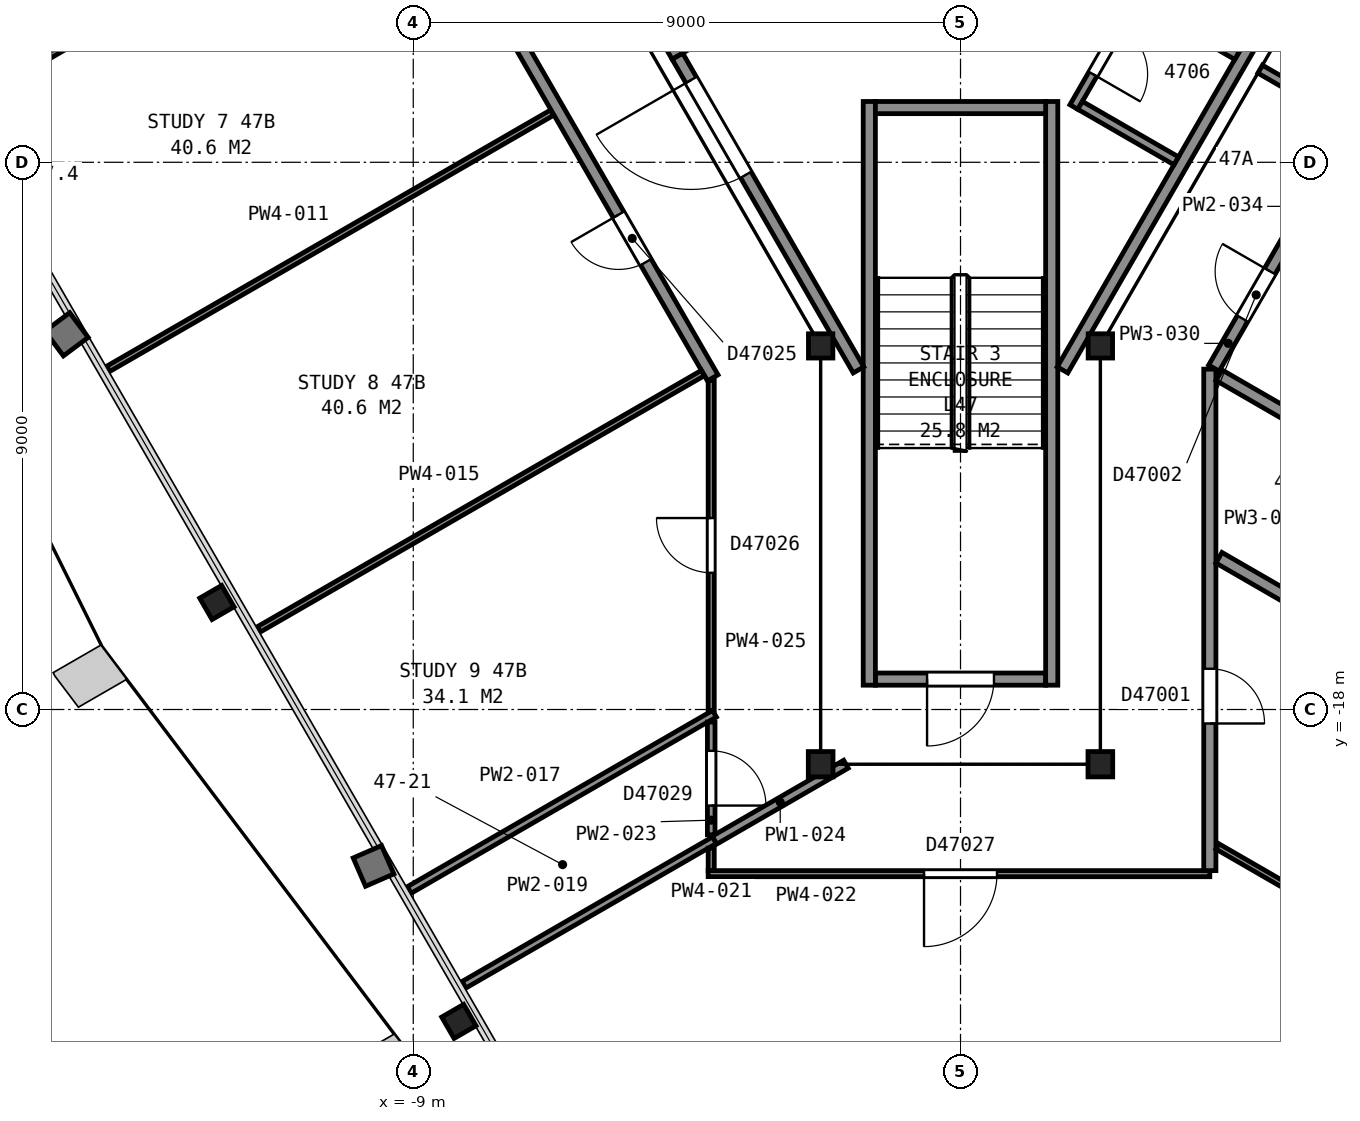
"""IFC4 building model, lengths in metres.
Left out: names, types, materials, properties, quantities, classifications, styles, units other than length and angle.
Written with IfcOpenShell. Run it as: python <this file> out.ifc"""

import sys

from ifc_helpers import new_model, si_unit, direction, frame, frame_2d, origin, origin_2d, place, context, subcontext, project, spatial, rectangle, i_section, extrude, element, fill, save


model = new_model("IFC4")
c1 = context("Model", 3, precision=1e-05, world=origin(), true_north=direction((0.0, 1.0)))
c2 = subcontext(c1, "Body", "Model", "MODEL_VIEW")
j1 = project(units=[si_unit("LENGTHUNIT", "METRE"), si_unit("PLANEANGLEUNIT", "RADIAN")], contexts=[c1])
p1 = place(None, origin())
s1 = spatial("IfcSite", under=j1, at=p1, CompositionType="ELEMENT")
p2 = place(p1, origin())
s2 = spatial("IfcBuilding", under=s1, at=p2, CompositionType="ELEMENT")
p3 = place(p2, frame((0.0, 0.0, 189.5)))
s3 = spatial("IfcBuildingStorey", under=s2, at=p3, CompositionType="ELEMENT", Elevation=189.5)
p4 = place(p3, frame((-12.23, -16.24, 0.035), z_axis=(0.0, 0.0, 1.0), x_axis=(-0.5, 0.866025403784, 0.0)))
e1 = element("IfcColumn", 1, at=p4, inside=s3, PredefinedType="COLUMN", context=c2, shape_type="SweptSolid", body=[
    extrude(i_section(OverallWidth=0.406, OverallDepth=0.417, WebThickness=0.03, FlangeThickness=0.048, FilletRadius=0.015, at=origin_2d()), origin(), (0.0, 0.0, 1.0), 3.665),
])
p5 = place(p3, frame((-8.25, -23.13, 0.04), z_axis=(0.0, 0.0, 1.0), x_axis=(-0.5, 0.866025403784, 0.0)))
e2 = element("IfcColumn", 2, at=p5, inside=s3, PredefinedType="COLUMN", context=c2, shape_type="SweptSolid", body=[
    extrude(i_section(OverallWidth=0.406, OverallDepth=0.417, WebThickness=0.03, FlangeThickness=0.048, FilletRadius=0.015, at=origin_2d()), origin(), (0.0, 0.0, 1.0), 3.66),
])
p6 = place(p3, frame((-2.3, -12.02, 0.0), z_axis=(0.0, 0.0, 1.0), x_axis=(1.0, 0.0, 0.0)))
e3 = element("IfcColumn", 3, at=p6, inside=s3, PredefinedType="COLUMN", context=c2, shape_type="SweptSolid", body=[
    extrude(i_section(OverallWidth=0.401, OverallDepth=0.399, WebThickness=0.025, FlangeThickness=0.04, FilletRadius=0.015, at=origin_2d()), origin(), (0.0, 0.0, 1.0), 3.7),
])
for number, where, z_axis, x_axis in (
    (4, (-2.3, -18.9, 0.0), (0.0, 0.0, 1.0), (-1.0, 0.0, 0.0)),
    (5, (2.3, -18.9, 0.0), (0.0, 0.0, 1.0), (-1.0, 0.0, 0.0)),
):
    element("IfcColumn", number, at=place(p3, frame(where, z_axis=z_axis, x_axis=x_axis)), inside=s3, PredefinedType="COLUMN", context=c2, shape_type="SweptSolid", body=[
        extrude(i_section(OverallWidth=0.406, OverallDepth=0.417, WebThickness=0.03, FlangeThickness=0.048, FilletRadius=0.015, at=origin_2d()), origin(), (0.0, 0.0, 1.0), 3.7),
    ])
p7 = place(p3, frame((2.3, -12.02, 0.0), z_axis=(0.0, 0.0, 1.0), x_axis=(1.0, 0.0, 0.0)))
e6 = element("IfcColumn", 6, at=p7, inside=s3, PredefinedType="COLUMN", context=c2, shape_type="SweptSolid", body=[
    extrude(i_section(OverallWidth=0.401, OverallDepth=0.399, WebThickness=0.025, FlangeThickness=0.04, FilletRadius=0.015, at=origin_2d()), origin(), (0.0, 0.0, 1.0), 3.7),
])
p8 = place(p3, frame((-1.4, -17.5, 0.0), z_axis=(0.0, 0.0, 1.0), x_axis=(1.0, 0.0, 0.0)))
e7 = element("IfcWall", 7, at=p8, inside=s3, PredefinedType="PARTITIONING", context=c2, shape_type="SweptSolid", body=[
    extrude(rectangle(XDim=2.8, YDim=0.2, at=frame_2d((1.4, 0.0))), origin(), (0.0, 0.0, 1.0), 3.45),
])
p9 = place(p8, frame((0.85, 0.0, 0.0)))
e8 = element("IfcOpeningElement", 8, at=p9, cuts=e7, PredefinedType="OPENING", context=c2, shape_type="SweptSolid", body=[
    extrude(rectangle(XDim=1.1, YDim=2.1, at=frame_2d((0.55, 1.05))), frame((0.0, 0.11, 0.0), z_axis=(0.0, -1.0, 0.0), x_axis=(1.0, 0.0, 0.0)), (0.0, 0.0, 1.0), 0.22),
])
for number, where, z_axis, x_axis in (
    (9, (1.5, -8.0, 0.0), (0.0, 0.0, 1.0), (0.0, -1.0, 0.0)),
    (10, (-1.5, -8.0, 0.0), (0.0, 0.0, 1.0), (0.0, -1.0, 0.0)),
):
    element("IfcWall", number, at=place(p3, frame(where, z_axis=z_axis, x_axis=x_axis)), inside=s3, PredefinedType="PARTITIONING", context=c2, shape_type="SweptSolid", body=[
        extrude(rectangle(XDim=9.6, YDim=0.2, at=frame_2d((4.8, 0.0))), origin(), (0.0, 0.0, 1.0), 3.45),
    ])
p10 = place(p3, frame((-1.4, -8.1, 0.0), z_axis=(0.0, 0.0, 1.0), x_axis=(1.0, 0.0, 0.0)))
e11 = element("IfcWall", 11, at=p10, inside=s3, PredefinedType="PARTITIONING", context=c2, shape_type="SweptSolid", body=[
    extrude(rectangle(XDim=2.8, YDim=0.2, at=frame_2d((1.4, 0.0))), origin(), (0.0, 0.0, 1.0), 3.45),
])
p11 = place(p3, frame((-4.62, -7.118, 0.0), z_axis=(0.0, 0.0, 1.0), x_axis=(0.866036909293, 0.499980071345, 0.0)))
e12 = element("IfcWall", 12, at=p11, inside=s3, PredefinedType="PARTITIONING", context=c2, shape_type="SweptSolid", body=[
    extrude(rectangle(XDim=1.75, YDim=0.2, at=frame_2d((0.875, 0.0))), origin(), (0.0, 0.0, 1.0), 3.7),
])
p12 = place(p3, frame((-4.656, -7.255, 0.0), z_axis=(0.0, 0.0, 1.0), x_axis=(-0.499990435942, 0.866030925526, 0.0)))
e13 = element("IfcWall", 13, at=p12, inside=s3, PredefinedType="PARTITIONING", context=c2, shape_type="SweptSolid", body=[
    extrude(rectangle(XDim=2.55, YDim=0.2, at=frame_2d((1.275, 0.0))), origin(), (0.0, 0.0, 1.0), 3.7),
])
p13 = place(p3, frame((-4.655, -7.257, 0.0), z_axis=(0.0, 0.0, 1.0), x_axis=(0.499966124405, -0.866044960985, 0.0)))
e14 = element("IfcWall", 14, at=p13, inside=s3, PredefinedType="PARTITIONING", context=c2, shape_type="SweptSolid", body=[
    extrude(rectangle(XDim=5.956, YDim=0.2, at=frame_2d((2.978, 0.0))), origin(), (0.0, 0.0, 1.0), 3.45),
])
p14 = place(p13, frame((0.45, 0.0, 0.0)))
e15 = element("IfcOpeningElement", 15, at=p14, cuts=e14, PredefinedType="OPENING", context=c2, shape_type="SweptSolid", body=[
    extrude(rectangle(XDim=1.8, YDim=2.1, at=frame_2d((0.9, 1.05))), frame((0.0, 0.11, 0.0), z_axis=(0.0, -1.0, 0.0), x_axis=(1.0, 0.0, 0.0)), (0.0, 0.0, 1.0), 0.22),
])
p15 = place(p3, frame((1.677, -12.415, 0.0), z_axis=(0.0, 0.0, 1.0), x_axis=(0.500054337157, 0.865994029939, 0.0)))
e16 = element("IfcWall", 16, at=p15, inside=s3, PredefinedType="PARTITIONING", context=c2, shape_type="SweptSolid", body=[
    extrude(rectangle(XDim=6.177, YDim=0.2, at=frame_2d((3.088, 0.0))), origin(), (0.0, 0.0, 1.0), 3.45),
])
p16 = place(p3, frame((2.939, -6.229, 0.0), z_axis=(0.0, 0.0, 1.0), x_axis=(-0.499961633463, -0.866047553582, 0.0)))
e17 = element("IfcWall", 17, at=p16, inside=s3, PredefinedType="PARTITIONING", context=c2, shape_type="SweptSolid", body=[
    extrude(rectangle(XDim=2.15, YDim=0.15, at=frame_2d((1.075, 0.0))), origin(), (0.0, 0.0, 1.0), 3.45),
])
p17 = place(p16, frame((0.625, 0.0, 0.0)))
e18 = element("IfcOpeningElement", 18, at=p17, cuts=e17, PredefinedType="OPENING", context=c2, shape_type="SweptSolid", body=[
    extrude(rectangle(XDim=0.9, YDim=2.1, at=frame_2d((0.45, 1.05))), frame((0.0, 0.085, 0.0), z_axis=(0.0, -1.0, 0.0), x_axis=(1.0, 0.0, 0.0)), (0.0, 0.0, 1.0), 0.17),
])
p18 = place(p3, frame((1.967, -8.063, 0.0), z_axis=(0.0, 0.0, 1.0), x_axis=(0.865978377894, -0.500081442387, 0.0)))
e19 = element("IfcWall", 19, at=p18, inside=s3, PredefinedType="PARTITIONING", context=c2, shape_type="SweptSolid", body=[
    extrude(rectangle(XDim=1.825, YDim=0.15, at=frame_2d((0.913, 0.0))), origin(), (0.0, 0.0, 1.0), 3.45),
])
p19 = place(p3, frame((2.967, -6.332, 0.0), z_axis=(0.0, 0.0, 1.0), x_axis=(0.866036312054, -0.499981105847, 0.0)))
e20 = element("IfcWall", 20, at=p19, inside=s3, PredefinedType="PARTITIONING", context=c2, shape_type="SweptSolid", body=[
    extrude(rectangle(XDim=1.825, YDim=0.15, at=frame_2d((0.912, 0.0))), origin(), (0.0, 0.0, 1.0), 3.45),
])
p20 = place(p3, frame((-16.489, -8.11, 0.0), z_axis=(0.0, 0.0, 1.0), x_axis=(0.865995531057, 0.500051737513, 0.0)))
e21 = element("IfcWall", 21, at=p20, inside=s3, PredefinedType="PARTITIONING", context=c2, shape_type="SweptSolid", body=[
    extrude(rectangle(XDim=8.429, YDim=0.1, at=frame_2d((4.214, 0.0))), origin(), (0.0, 0.0, 1.0), 2.713),
])
p21 = place(p3, frame((-14.015, -12.396, 0.0), z_axis=(0.0, 0.0, 1.0), x_axis=(0.866079962101, 0.499905490315, 0.0)))
e22 = element("IfcWall", 22, at=p21, inside=s3, PredefinedType="PARTITIONING", context=c2, shape_type="SweptSolid", body=[
    extrude(rectangle(XDim=8.429, YDim=0.1, at=frame_2d((4.214, 0.0))), origin(), (0.0, 0.0, 1.0), 2.713),
])
p22 = place(p3, frame((-4.075, -12.545, 0.0), z_axis=(0.0, 0.0, 1.0), x_axis=(-0.499999743747, 0.866025551732, 0.0)))
e23 = element("IfcWall", 23, at=p22, inside=s3, PredefinedType="PARTITIONING", context=c2, shape_type="SweptSolid", body=[
    extrude(rectangle(XDim=17.656, YDim=0.2, at=frame_2d((8.828, 0.0))), origin(), (0.0, 0.0, 1.0), 2.713),
])
p23 = place(p22, frame((10.83, 0.0, 0.0)))
e24 = element("IfcOpeningElement", 24, at=p23, cuts=e23, PredefinedType="OPENING", context=c2, shape_type="SweptSolid", body=[
    extrude(rectangle(XDim=0.9, YDim=2.1, at=frame_2d((0.45, 1.05))), frame((0.0, 0.11, 0.0), z_axis=(0.0, -1.0, 0.0), x_axis=(1.0, 0.0, 0.0)), (0.0, 0.0, 1.0), 0.22),
])
p24 = place(p22, frame((7.148, 0.0, 0.0)))
e25 = element("IfcOpeningElement", 25, at=p24, cuts=e23, PredefinedType="OPENING", context=c2, shape_type="SweptSolid", body=[
    extrude(rectangle(XDim=0.9, YDim=2.1, at=frame_2d((0.45, 1.05))), frame((0.0, 0.11, 0.0), z_axis=(0.0, -1.0, 0.0), x_axis=(1.0, 0.0, 0.0)), (0.0, 0.0, 1.0), 0.22),
])
p25 = place(p22, frame((2.198, 0.0, 0.0)))
e26 = element("IfcOpeningElement", 26, at=p25, cuts=e23, PredefinedType="OPENING", context=c2, shape_type="SweptSolid", body=[
    extrude(rectangle(XDim=0.9, YDim=2.1, at=frame_2d((0.45, 1.05))), frame((0.0, 0.11, 0.0), z_axis=(0.0, -1.0, 0.0), x_axis=(1.0, 0.0, 0.0)), (0.0, 0.0, 1.0), 0.22),
])
p26 = place(p3, frame((-11.54, -16.682, 0.0), z_axis=(0.0, 0.0, 1.0), x_axis=(0.866063141794, 0.499934630153, 0.0)))
e27 = element("IfcWall", 27, at=p26, inside=s3, PredefinedType="PARTITIONING", context=c2, shape_type="SweptSolid", body=[
    extrude(rectangle(XDim=8.433, YDim=0.1, at=frame_2d((4.217, 0.0))), origin(), (0.0, 0.0, 1.0), 2.713),
])
p27 = place(p3, frame((-9.066, -20.968, 0.0), z_axis=(0.0, 0.0, 1.0), x_axis=(0.866023559602, 0.500003194204, 0.0)))
e28 = element("IfcWall", 28, at=p27, inside=s3, PredefinedType="PARTITIONING", context=c2, shape_type="SweptSolid", body=[
    extrude(rectangle(XDim=5.796, YDim=0.125, at=frame_2d((2.898, 0.0))), origin(), (0.0, 0.0, 1.0), 2.713),
])
p28 = place(p3, frame((-8.166, -22.527, 0.0), z_axis=(0.0, 0.0, 1.0), x_axis=(0.866042865666, 0.499969753915, 0.0)))
e29 = element("IfcWall", 29, at=p28, inside=s3, PredefinedType="PARTITIONING", context=c2, shape_type="SweptSolid", body=[
    extrude(rectangle(XDim=4.757, YDim=0.125, at=frame_2d((2.378, 0.0))), origin(), (0.0, 0.0, 1.0), 2.713),
])
p29 = place(p3, frame((-4.1, -20.65, 0.0), z_axis=(0.0, 0.0, 1.0), x_axis=(0.0, 1.0, 0.0)))
e30 = element("IfcWall", 30, at=p29, inside=s3, PredefinedType="PARTITIONING", context=c2, shape_type="SweptSolid", body=[
    extrude(rectangle(XDim=0.37, YDim=0.1, at=frame_2d((0.185, 0.0))), origin(), (0.0, 0.0, 1.0), 2.713),
])
p30 = place(p3, frame((4.1, -20.7, 0.0), z_axis=(0.0, 0.0, 1.0), x_axis=(-1.0, 0.0, 0.0)))
e31 = element("IfcWall", 31, at=p30, inside=s3, PredefinedType="PARTITIONING", context=c2, shape_type="SweptSolid", body=[
    extrude(rectangle(XDim=8.25, YDim=0.1, at=frame_2d((4.125, 0.0))), origin(), (0.0, 0.0, 1.0), 2.713),
])
p31 = place(p30, frame((3.5, 0.0, 0.0)))
e32 = element("IfcOpeningElement", 32, at=p31, cuts=e31, PredefinedType="OPENING", context=c2, shape_type="SweptSolid", body=[
    extrude(rectangle(XDim=1.2, YDim=2.1, at=frame_2d((0.6, 1.05))), frame((0.0, 0.06, 0.0), z_axis=(0.0, -1.0, 0.0), x_axis=(1.0, 0.0, 0.0)), (0.0, 0.0, 1.0), 0.12),
])
p32 = place(p3, frame((-4.1, -18.206, 0.0), z_axis=(0.0, 0.0, 1.0), x_axis=(0.0, -1.0, 0.0)))
e33 = element("IfcWall", 33, at=p32, inside=s3, PredefinedType="PARTITIONING", context=c2, shape_type="SweptSolid", body=[
    extrude(rectangle(XDim=1.854, YDim=0.125, at=frame_2d((0.927, 0.0))), origin(), (0.0, 0.0, 1.0), 2.713),
])
p33 = place(p32, frame((0.474, 0.0, 0.0)))
e34 = element("IfcOpeningElement", 34, at=p33, cuts=e33, PredefinedType="OPENING", context=c2, shape_type="SweptSolid", body=[
    extrude(rectangle(XDim=0.9, YDim=2.1, at=frame_2d((0.45, 1.05))), frame((0.0, 0.073, 0.0), z_axis=(0.0, -1.0, 0.0), x_axis=(1.0, 0.0, 0.0)), (0.0, 0.0, 1.0), 0.145),
])
p34 = place(p3, frame((-4.046, -20.149, 0.0), z_axis=(0.0, 0.0, 1.0), x_axis=(0.865916841101, 0.500187988959, 0.0)))
e35 = element("IfcWall", 35, at=p34, inside=s3, PredefinedType="PARTITIONING", context=c2, shape_type="SweptSolid", body=[
    extrude(rectangle(XDim=2.497, YDim=0.15, at=frame_2d((1.248, 0.0))), origin(), (0.0, 0.0, 1.0), 2.713),
])
p35 = place(p3, frame((-4.1, -18.016, 0.0), z_axis=(0.0, 0.0, 1.0), x_axis=(0.0, 1.0, 0.0)))
e36 = element("IfcWall", 36, at=p35, inside=s3, PredefinedType="PARTITIONING", context=c2, shape_type="SweptSolid", body=[
    extrude(rectangle(XDim=5.429, YDim=0.1, at=frame_2d((2.715, 0.0))), origin(), (0.0, 0.0, 1.0), 2.713),
])
p36 = place(p35, frame((2.265, 0.0, 0.0)))
e37 = element("IfcOpeningElement", 37, at=p36, cuts=e36, PredefinedType="OPENING", context=c2, shape_type="SweptSolid", body=[
    extrude(rectangle(XDim=0.9, YDim=2.1, at=frame_2d((0.45, 1.05))), frame((0.0, 0.06, 0.0), z_axis=(0.0, -1.0, 0.0), x_axis=(1.0, 0.0, 0.0)), (0.0, 0.0, 1.0), 0.12),
])
p37 = place(p3, frame((4.1, -12.402, 0.0), z_axis=(0.0, 0.0, 1.0), x_axis=(0.0, -1.0, 0.0)))
e38 = element("IfcWall", 38, at=p37, inside=s3, PredefinedType="PARTITIONING", context=c2, shape_type="SweptSolid", body=[
    extrude(rectangle(XDim=8.248, YDim=0.2, at=frame_2d((4.124, 0.0))), origin(), (0.0, 0.0, 1.0), 2.713),
])
p38 = place(p37, frame((4.928, 0.0, 0.0)))
e39 = element("IfcOpeningElement", 39, at=p38, cuts=e38, PredefinedType="OPENING", context=c2, shape_type="SweptSolid", body=[
    extrude(rectangle(XDim=0.9, YDim=2.1, at=frame_2d((0.45, 1.05))), frame((0.0, 0.11, 0.0), z_axis=(0.0, -1.0, 0.0), x_axis=(1.0, 0.0, 0.0)), (0.0, 0.0, 1.0), 0.22),
])
p39 = place(p3, frame((4.225, -20.252, 0.0), z_axis=(0.0, 0.0, 1.0), x_axis=(0.866048884701, -0.499959327653, 0.0)))
e40 = element("IfcWall", 40, at=p39, inside=s3, PredefinedType="PARTITIONING", context=c2, shape_type="SweptSolid", body=[
    extrude(rectangle(XDim=4.55, YDim=0.1, at=frame_2d((2.275, 0.0))), origin(), (0.0, 0.0, 1.0), 2.713),
])
p40 = place(p3, frame((4.25, -15.504, 0.0), z_axis=(0.0, 0.0, 1.0), x_axis=(0.866025383743, -0.500000034713, 0.0)))
e41 = element("IfcWall", 41, at=p40, inside=s3, PredefinedType="PARTITIONING", context=c2, shape_type="SweptSolid", body=[
    extrude(rectangle(XDim=6.903, YDim=0.2, at=frame_2d((3.451, 0.0))), origin(), (0.0, 0.0, 1.0), 2.713),
])
p41 = place(p3, frame((5.556, -9.98, 0.0), z_axis=(0.0, 0.0, 1.0), x_axis=(-0.499940639567, -0.866059672834, 0.0)))
e42 = element("IfcWall", 42, at=p41, inside=s3, PredefinedType="PARTITIONING", context=c2, shape_type="SweptSolid", body=[
    extrude(rectangle(XDim=2.777, YDim=0.2, at=frame_2d((1.388, 0.0))), origin(), (0.0, 0.0, 1.0), 2.713),
])
p42 = place(p41, frame((0.937, 0.0, 0.0)))
e43 = element("IfcOpeningElement", 43, at=p42, cuts=e42, PredefinedType="OPENING", context=c2, shape_type="SweptSolid", body=[
    extrude(rectangle(XDim=0.9, YDim=2.1, at=frame_2d((0.45, 1.05))), frame((0.0, 0.11, 0.0), z_axis=(0.0, -1.0, 0.0), x_axis=(1.0, 0.0, 0.0)), (0.0, 0.0, 1.0), 0.22),
])
p43 = place(p3, frame((4.25, -12.502, 0.0), z_axis=(0.0, 0.0, 1.0), x_axis=(0.866032087317, -0.499988423603, 0.0)))
e44 = element("IfcWall", 44, at=p43, inside=s3, PredefinedType="PARTITIONING", context=c2, shape_type="SweptSolid", body=[
    extrude(rectangle(XDim=3.39, YDim=0.2, at=frame_2d((1.695, 0.0))), origin(), (0.0, 0.0, 1.0), 2.713),
])
p44 = place(p3, frame((4.928, -7.468, 0.0), z_axis=(0.0, 0.0, 1.0), x_axis=(0.866075426483, -0.499913348133, 0.0)))
e45 = element("IfcWall", 45, at=p44, inside=s3, PredefinedType="PARTITIONING", context=c2, shape_type="SweptSolid", body=[
    extrude(rectangle(XDim=1.698, YDim=0.15, at=frame_2d((0.849, 0.0))), origin(), (0.0, 0.0, 1.0), 2.713),
])
p45 = place(p9, origin())
e46 = element("IfcDoor", 46, at=p45, inside=s3, OperationType="SINGLE_SWING_LEFT", PredefinedType="DOOR", context=c2, shape_type="SweptSolid", body=[
    extrude(rectangle(XDim=1.1, YDim=2.1, at=frame_2d((0.55, 1.05))), frame((0.0, 0.025, 0.0), z_axis=(0.0, -1.0, 0.0), x_axis=(1.0, 0.0, 0.0)), (0.0, 0.0, 1.0), 0.05),
])
fill(e8, e46)
p46 = place(p14, origin())
e47 = element("IfcDoor", 47, at=p46, inside=s3, OperationType="DOUBLE_DOOR_SINGLE_SWING", PredefinedType="DOOR", context=c2, shape_type="SweptSolid", body=[
    extrude(rectangle(XDim=1.8, YDim=2.1, at=frame_2d((0.9, 1.05))), frame((0.0, 0.025, 0.0), z_axis=(0.0, -1.0, 0.0), x_axis=(1.0, 0.0, 0.0)), (0.0, 0.0, 1.0), 0.05),
])
fill(e15, e47)
p47 = place(p17, origin())
e48 = element("IfcDoor", 48, at=p47, inside=s3, OperationType="SINGLE_SWING_RIGHT", PredefinedType="DOOR", context=c2, shape_type="SweptSolid", body=[
    extrude(rectangle(XDim=0.9, YDim=2.1, at=frame_2d((0.45, 1.05))), frame((0.0, 0.025, 0.0), z_axis=(0.0, -1.0, 0.0), x_axis=(1.0, 0.0, 0.0)), (0.0, 0.0, 1.0), 0.05),
])
fill(e18, e48)
p48 = place(p25, origin())
e49 = element("IfcDoor", 49, at=p48, inside=s3, OperationType="SINGLE_SWING_RIGHT", PredefinedType="DOOR", context=c2, shape_type="SweptSolid", body=[
    extrude(rectangle(XDim=0.9, YDim=2.1, at=frame_2d((0.45, 1.05))), frame((0.0, 0.025, 0.0), z_axis=(0.0, -1.0, 0.0), x_axis=(1.0, 0.0, 0.0)), (0.0, 0.0, 1.0), 0.05),
])
fill(e26, e49)
p49 = place(p31, origin())
e50 = element("IfcDoor", 50, at=p49, inside=s3, OperationType="SINGLE_SWING_RIGHT", PredefinedType="DOOR", context=c2, shape_type="SweptSolid", body=[
    extrude(rectangle(XDim=1.2, YDim=2.1, at=frame_2d((0.6, 1.05))), frame((0.0, 0.025, 0.0), z_axis=(0.0, -1.0, 0.0), x_axis=(1.0, 0.0, 0.0)), (0.0, 0.0, 1.0), 0.05),
])
fill(e32, e50)
p50 = place(p33, origin())
e51 = element("IfcDoor", 51, at=p50, inside=s3, OperationType="SINGLE_SWING_RIGHT", PredefinedType="DOOR", context=c2, shape_type="SweptSolid", body=[
    extrude(rectangle(XDim=0.9, YDim=2.1, at=frame_2d((0.45, 1.05))), frame((0.0, 0.025, 0.0), z_axis=(0.0, -1.0, 0.0), x_axis=(1.0, 0.0, 0.0)), (0.0, 0.0, 1.0), 0.05),
])
fill(e34, e51)
p51 = place(p36, origin())
e52 = element("IfcDoor", 52, at=p51, inside=s3, OperationType="SINGLE_SWING_RIGHT", PredefinedType="DOOR", context=c2, shape_type="SweptSolid", body=[
    extrude(rectangle(XDim=0.9, YDim=2.1, at=frame_2d((0.45, 1.05))), frame((0.0, 0.025, 0.0), z_axis=(0.0, -1.0, 0.0), x_axis=(1.0, 0.0, 0.0)), (0.0, 0.0, 1.0), 0.05),
])
fill(e37, e52)
p52 = place(p38, origin())
e53 = element("IfcDoor", 53, at=p52, inside=s3, OperationType="SINGLE_SWING_RIGHT", PredefinedType="DOOR", context=c2, shape_type="SweptSolid", body=[
    extrude(rectangle(XDim=0.9, YDim=2.1, at=frame_2d((0.45, 1.05))), frame((0.0, 0.025, 0.0), z_axis=(0.0, -1.0, 0.0), x_axis=(1.0, 0.0, 0.0)), (0.0, 0.0, 1.0), 0.05),
])
fill(e39, e53)
p53 = place(p42, origin())
e54 = element("IfcDoor", 54, at=p53, inside=s3, OperationType="SINGLE_SWING_LEFT", PredefinedType="DOOR", context=c2, shape_type="SweptSolid", body=[
    extrude(rectangle(XDim=0.9, YDim=2.1, at=frame_2d((0.45, 1.05))), frame((0.0, 0.025, 0.0), z_axis=(0.0, -1.0, 0.0), x_axis=(1.0, 0.0, 0.0)), (0.0, 0.0, 1.0), 0.05),
])
fill(e43, e54)
save(model, sys.argv[1])
